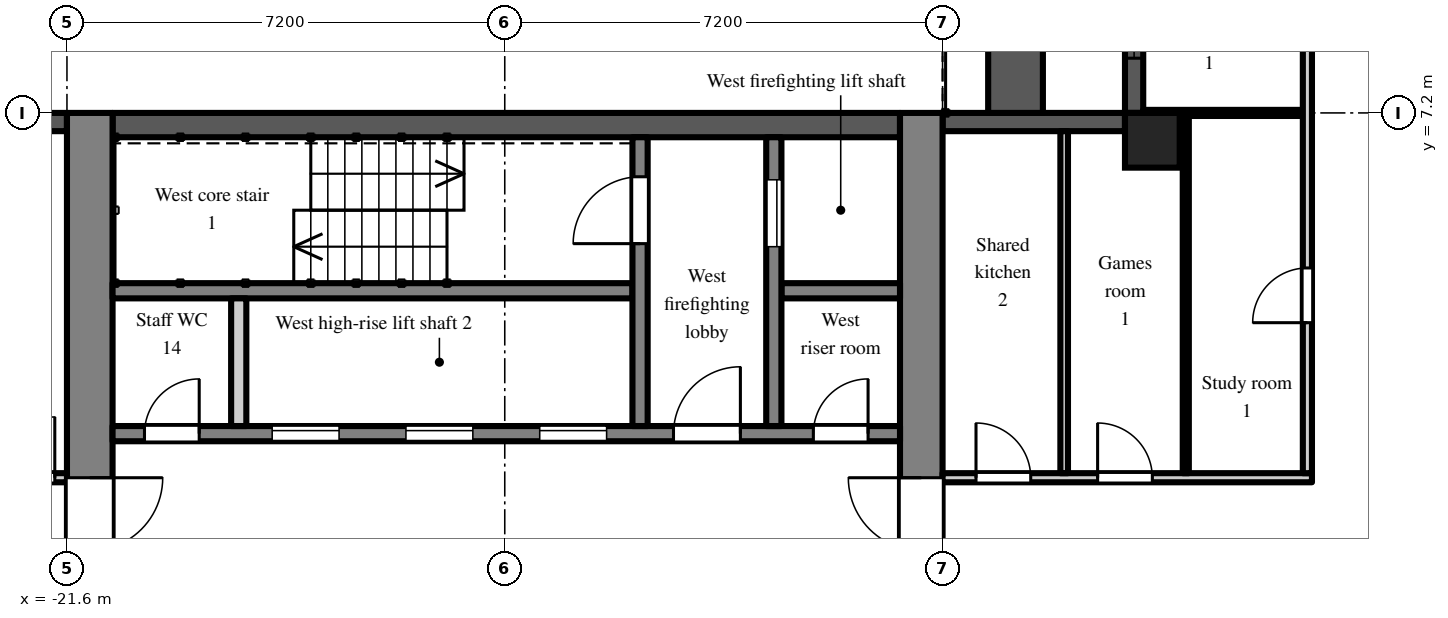
"""IFC4 building model, lengths in metres.
Left out: names, types, materials, properties, quantities, classifications, styles, units other than length and angle.
Written with IfcOpenShell. Run it as: python <this file> out.ifc"""

import sys

from ifc_helpers import new_model, si_unit, direction, frame, frame_2d, origin, origin_2d, place, context, subcontext, project, spatial, rectangle, extrude, element, fill, save


model = new_model("IFC4")
c1 = context("Model", 3, precision=1e-05, world=origin(), true_north=direction((0.0, 1.0)))
c2 = subcontext(c1, "Body", "Model", "MODEL_VIEW")
j1 = project(units=[si_unit("LENGTHUNIT", "METRE"), si_unit("PLANEANGLEUNIT", "RADIAN")], contexts=[c1])
p1 = place(None, origin())
s1 = spatial("IfcSite", under=j1, at=p1, CompositionType="ELEMENT")
p2 = place(p1, origin())
s2 = spatial("IfcBuilding", under=s1, at=p2, CompositionType="ELEMENT")
p3 = place(p2, frame((0.0, 0.0, 198.9)))
s3 = spatial("IfcBuildingStorey", under=s2, at=p3, CompositionType="ELEMENT", Elevation=198.9)
p4 = place(p3, frame((-3.75, 6.75, 0.0), z_axis=(0.0, 0.0, 1.0), x_axis=(1.0, 0.0, 0.0)))
e1 = element("IfcColumn", 1, at=p4, inside=s3, PredefinedType="COLUMN", context=c2, shape_type="SweptSolid", body=[
    extrude(rectangle(XDim=0.9, YDim=0.9, at=origin_2d()), origin(), (0.0, 0.0, 1.0), 3.0),
])
p5 = place(p3, frame((-4.05, 14.4, 0.0), z_axis=(0.0, 0.0, 1.0), x_axis=(0.0, -1.0, 0.0)))
e2 = element("IfcWall", 2, at=p5, inside=s3, PredefinedType="SOLIDWALL", context=c2, shape_type="SweptSolid", body=[
    extrude(rectangle(XDim=7.2, YDim=0.3, at=frame_2d((3.6, 0.0))), origin(), (0.0, 0.0, 1.0), 2.3),
])
p6 = place(p5, frame((3.0, 0.0, 0.0)))
e3 = element("IfcOpeningElement", 3, at=p6, cuts=e2, PredefinedType="OPENING", context=c2, shape_type="SweptSolid", body=[
    extrude(rectangle(XDim=1.2, YDim=2.05, at=frame_2d((0.6, 1.025))), frame((0.0, 0.16, 0.0), z_axis=(0.0, -1.0, 0.0), x_axis=(1.0, 0.0, 0.0)), (0.0, 0.0, 1.0), 0.32),
])
p7 = place(p5, frame((0.9, 0.0, 0.2)))
e4 = element("IfcOpeningElement", 4, at=p7, cuts=e2, PredefinedType="OPENING", context=c2, shape_type="SweptSolid", body=[
    extrude(rectangle(XDim=1.8, YDim=1.85, at=frame_2d((0.9, 0.925))), frame((0.0, 0.16, 0.0), z_axis=(0.0, -1.0, 0.0), x_axis=(1.0, 0.0, 0.0)), (0.0, 0.0, 1.0), 0.32),
])
p8 = place(p5, frame((4.5, 0.0, 0.2)))
e5 = element("IfcOpeningElement", 5, at=p8, cuts=e2, PredefinedType="OPENING", context=c2, shape_type="SweptSolid", body=[
    extrude(rectangle(XDim=1.8, YDim=1.85, at=frame_2d((0.9, 0.925))), frame((0.0, 0.16, 0.0), z_axis=(0.0, -1.0, 0.0), x_axis=(1.0, 0.0, 0.0)), (0.0, 0.0, 1.0), 0.32),
])
p9 = place(p3, frame((-4.2, 7.05, 0.0), z_axis=(0.0, 0.0, 1.0), x_axis=(-1.0, 0.0, 0.0)))
e6 = element("IfcWall", 6, at=p9, inside=s3, PredefinedType="SOLIDWALL", context=c2, shape_type="SweptSolid", body=[
    extrude(rectangle(XDim=3.0, YDim=0.3, at=frame_2d((1.5, 0.0))), origin(), (0.0, 0.0, 1.0), 2.3),
])
p10 = place(p3, frame((-21.6, 7.05, 0.0), z_axis=(0.0, 0.0, 1.0), x_axis=(-1.0, 0.0, 0.0)))
e7 = element("IfcWall", 7, at=p10, inside=s3, PredefinedType="SOLIDWALL", context=c2, shape_type="SweptSolid", body=[
    extrude(rectangle(XDim=2.7, YDim=0.3, at=frame_2d((1.35, 0.0))), origin(), (0.0, 0.0, 1.0), 2.3),
])
p11 = place(p10, frame((0.75, 0.0, 0.2)))
e8 = element("IfcOpeningElement", 8, at=p11, cuts=e7, PredefinedType="OPENING", context=c2, shape_type="SweptSolid", body=[
    extrude(rectangle(XDim=1.2, YDim=1.85, at=frame_2d((0.6, 0.925))), frame((0.0, 0.16, 0.0), z_axis=(0.0, -1.0, 0.0), x_axis=(1.0, 0.0, 0.0)), (0.0, 0.0, 1.0), 0.32),
])
p12 = place(p3, frame((-6.0, 7.2, 0.0), z_axis=(0.0, 0.0, 1.0), x_axis=(0.0, 1.0, 0.0)))
e9 = element("IfcWall", 9, at=p12, inside=s3, PredefinedType="PARAPET", context=c2, shape_type="SweptSolid", body=[
    extrude(rectangle(XDim=7.2, YDim=0.9, at=frame_2d((3.6, 0.0))), origin(), (0.0, 0.0, 1.0), 0.8),
])
p13 = place(p3, frame((-7.55, -7.2, 0.0), z_axis=(0.0, 0.0, 1.0), x_axis=(0.0, 1.0, 0.0)))
e10 = element("IfcWall", 10, at=p13, inside=s3, PredefinedType="SHEAR", context=c2, shape_type="SweptSolid", body=[
    extrude(rectangle(XDim=14.4, YDim=0.7, at=frame_2d((7.2, 0.0))), origin(), (0.0, 0.0, 1.0), 2.6),
])
p14 = place(p13, frame((6.0, 0.0, 0.0)))
e11 = element("IfcOpeningElement", 11, at=p14, cuts=e10, PredefinedType="OPENING", context=c2, shape_type="SweptSolid", body=[
    extrude(rectangle(XDim=2.4, YDim=2.2, at=frame_2d((1.2, 1.1))), frame((0.0, 0.36, 0.0), z_axis=(0.0, -1.0, 0.0), x_axis=(1.0, 0.0, 0.0)), (0.0, 0.0, 1.0), 0.72),
])
p15 = place(p3, frame((-21.225, -7.2, 0.0), z_axis=(0.0, 0.0, 1.0), x_axis=(0.0, 1.0, 0.0)))
e12 = element("IfcWall", 12, at=p15, inside=s3, PredefinedType="SHEAR", context=c2, shape_type="SweptSolid", body=[
    extrude(rectangle(XDim=14.4, YDim=0.75, at=frame_2d((7.2, 0.0))), origin(), (0.0, 0.0, 1.0), 2.6),
])
p16 = place(p15, frame((6.0, 0.0, 0.0)))
e13 = element("IfcOpeningElement", 13, at=p16, cuts=e12, PredefinedType="OPENING", context=c2, shape_type="SweptSolid", body=[
    extrude(rectangle(XDim=2.4, YDim=2.2, at=frame_2d((1.2, 1.1))), frame((0.0, 0.385, 0.0), z_axis=(0.0, -1.0, 0.0), x_axis=(1.0, 0.0, 0.0)), (0.0, 0.0, 1.0), 0.77),
])
p17 = place(p3, frame((-7.9, 7.0, 0.0), z_axis=(0.0, 0.0, 1.0), x_axis=(-1.0, 0.0, 0.0)))
e14 = element("IfcWall", 14, at=p17, inside=s3, PredefinedType="SHEAR", context=c2, shape_type="SweptSolid", body=[
    extrude(rectangle(XDim=12.95, YDim=0.4, at=frame_2d((6.475, 0.0))), origin(), (0.0, 0.0, 1.0), 2.6),
])
p18 = place(p3, frame((-7.9, 1.925, 0.0), z_axis=(0.0, 0.0, 1.0), x_axis=(-1.0, 0.0, 0.0)))
e15 = element("IfcWall", 15, at=p18, inside=s3, PredefinedType="SHEAR", context=c2, shape_type="SweptSolid", body=[
    extrude(rectangle(XDim=12.95, YDim=0.25, at=frame_2d((6.475, 0.0))), origin(), (0.0, 0.0, 1.0), 2.6),
])
p19 = place(p18, frame((4.825, 0.0, 0.0)))
e16 = element("IfcOpeningElement", 16, at=p19, cuts=e15, PredefinedType="OPENING", context=c2, shape_type="SweptSolid", body=[
    extrude(rectangle(XDim=1.1, YDim=2.1, at=frame_2d((0.55, 1.05))), frame((0.0, 0.135, 0.0), z_axis=(0.0, -1.0, 0.0), x_axis=(1.0, 0.0, 0.0)), (0.0, 0.0, 1.0), 0.27),
])
p20 = place(p18, frame((7.025, 0.0, 0.0)))
e17 = element("IfcOpeningElement", 17, at=p20, cuts=e15, PredefinedType="OPENING", context=c2, shape_type="SweptSolid", body=[
    extrude(rectangle(XDim=1.1, YDim=2.1, at=frame_2d((0.55, 1.05))), frame((0.0, 0.135, 0.0), z_axis=(0.0, -1.0, 0.0), x_axis=(1.0, 0.0, 0.0)), (0.0, 0.0, 1.0), 0.27),
])
p21 = place(p18, frame((9.225, 0.0, 0.0)))
e18 = element("IfcOpeningElement", 18, at=p21, cuts=e15, PredefinedType="OPENING", context=c2, shape_type="SweptSolid", body=[
    extrude(rectangle(XDim=1.1, YDim=2.1, at=frame_2d((0.55, 1.05))), frame((0.0, 0.135, 0.0), z_axis=(0.0, -1.0, 0.0), x_axis=(1.0, 0.0, 0.0)), (0.0, 0.0, 1.0), 0.27),
])
p22 = place(p18, frame((0.525, 0.0, 0.0)))
e19 = element("IfcOpeningElement", 19, at=p22, cuts=e15, PredefinedType="OPENING", context=c2, shape_type="SweptSolid", body=[
    extrude(rectangle(XDim=0.9, YDim=2.1, at=frame_2d((0.45, 1.05))), frame((0.0, 0.135, 0.0), z_axis=(0.0, -1.0, 0.0), x_axis=(1.0, 0.0, 0.0)), (0.0, 0.0, 1.0), 0.27),
])
p23 = place(p18, frame((2.625, 0.0, 0.0)))
e20 = element("IfcOpeningElement", 20, at=p23, cuts=e15, PredefinedType="OPENING", context=c2, shape_type="SweptSolid", body=[
    extrude(rectangle(XDim=1.1, YDim=2.1, at=frame_2d((0.55, 1.05))), frame((0.0, 0.135, 0.0), z_axis=(0.0, -1.0, 0.0), x_axis=(1.0, 0.0, 0.0)), (0.0, 0.0, 1.0), 0.27),
])
p24 = place(p18, frame((11.525, 0.0, 0.0)))
e21 = element("IfcOpeningElement", 21, at=p24, cuts=e15, PredefinedType="OPENING", context=c2, shape_type="SweptSolid", body=[
    extrude(rectangle(XDim=0.9, YDim=2.1, at=frame_2d((0.45, 1.05))), frame((0.0, 0.135, 0.0), z_axis=(0.0, -1.0, 0.0), x_axis=(1.0, 0.0, 0.0)), (0.0, 0.0, 1.0), 0.27),
])
p25 = place(p3, frame((-7.9, 4.275, 0.0), z_axis=(0.0, 0.0, 1.0), x_axis=(-1.0, 0.0, 0.0)))
e22 = element("IfcWall", 22, at=p25, inside=s3, PredefinedType="SHEAR", context=c2, shape_type="SweptSolid", body=[
    extrude(rectangle(XDim=1.95, YDim=0.25, at=frame_2d((0.975, 0.0))), origin(), (0.0, 0.0, 1.0), 2.6),
])
p26 = place(p3, frame((-12.3, 4.275, 0.0), z_axis=(0.0, 0.0, 1.0), x_axis=(-1.0, 0.0, 0.0)))
e23 = element("IfcWall", 23, at=p26, inside=s3, PredefinedType="SHEAR", context=c2, shape_type="SweptSolid", body=[
    extrude(rectangle(XDim=8.55, YDim=0.25, at=frame_2d((4.275, 0.0))), origin(), (0.0, 0.0, 1.0), 2.6),
])
p27 = place(p3, frame((-9.975, 2.05, 0.0), z_axis=(0.0, 0.0, 1.0), x_axis=(0.0, 1.0, 0.0)))
e24 = element("IfcWall", 24, at=p27, inside=s3, PredefinedType="SHEAR", context=c2, shape_type="SweptSolid", body=[
    extrude(rectangle(XDim=4.75, YDim=0.25, at=frame_2d((2.375, 0.0))), origin(), (0.0, 0.0, 1.0), 2.6),
])
p28 = place(p27, frame((2.95, 0.0, 0.0)))
e25 = element("IfcOpeningElement", 25, at=p28, cuts=e24, PredefinedType="OPENING", context=c2, shape_type="SweptSolid", body=[
    extrude(rectangle(XDim=1.1, YDim=2.1, at=frame_2d((0.55, 1.05))), frame((0.0, 0.135, 0.0), z_axis=(0.0, -1.0, 0.0), x_axis=(1.0, 0.0, 0.0)), (0.0, 0.0, 1.0), 0.27),
])
p29 = place(p3, frame((-12.175, 2.05, 0.0), z_axis=(0.0, 0.0, 1.0), x_axis=(0.0, 1.0, 0.0)))
e26 = element("IfcWall", 26, at=p29, inside=s3, PredefinedType="SHEAR", context=c2, shape_type="SweptSolid", body=[
    extrude(rectangle(XDim=4.75, YDim=0.25, at=frame_2d((2.375, 0.0))), origin(), (0.0, 0.0, 1.0), 2.6),
])
p30 = place(p29, frame((3.0, 0.0, 0.0)))
e27 = element("IfcOpeningElement", 27, at=p30, cuts=e26, PredefinedType="OPENING", context=c2, shape_type="SweptSolid", body=[
    extrude(rectangle(XDim=1.1, YDim=2.1, at=frame_2d((0.55, 1.05))), frame((0.0, 0.135, 0.0), z_axis=(0.0, -1.0, 0.0), x_axis=(1.0, 0.0, 0.0)), (0.0, 0.0, 1.0), 0.27),
])
p31 = place(p3, frame((-18.775, 2.05, 0.0), z_axis=(0.0, 0.0, 1.0), x_axis=(0.0, 1.0, 0.0)))
e28 = element("IfcWall", 28, at=p31, inside=s3, PredefinedType="PARTITIONING", context=c2, shape_type="SweptSolid", body=[
    extrude(rectangle(XDim=2.1, YDim=0.25, at=frame_2d((1.05, 0.0))), origin(), (0.0, 0.0, 1.0), 2.6),
])
p32 = place(p3, frame((-25.125, 1.2, 0.0), z_axis=(0.0, 0.0, 1.0), x_axis=(1.0, 0.0, 0.0)))
e29 = element("IfcWall", 29, at=p32, inside=s3, PredefinedType="PARTITIONING", context=c2, shape_type="SweptSolid", body=[
    extrude(rectangle(XDim=3.525, YDim=0.15, at=frame_2d((1.762, 0.0))), origin(), (0.0, 0.0, 1.0), 2.6),
])
p33 = place(p32, frame((2.325, 0.0, 0.0)))
e30 = element("IfcOpeningElement", 30, at=p33, cuts=e29, PredefinedType="OPENING", context=c2, shape_type="SweptSolid", body=[
    extrude(rectangle(XDim=1.0, YDim=2.1, at=frame_2d((0.5, 1.05))), frame((0.0, 0.085, 0.0), z_axis=(0.0, -1.0, 0.0), x_axis=(1.0, 0.0, 0.0)), (0.0, 0.0, 1.0), 0.17),
])
p34 = place(p3, frame((-7.2, 1.2, 0.0), z_axis=(0.0, 0.0, 1.0), x_axis=(1.0, 0.0, 0.0)))
e31 = element("IfcWall", 31, at=p34, inside=s3, PredefinedType="PARTITIONING", context=c2, shape_type="SweptSolid", body=[
    extrude(rectangle(XDim=6.075, YDim=0.15, at=frame_2d((3.038, 0.0))), origin(), (0.0, 0.0, 1.0), 2.6),
])
p35 = place(p34, frame((2.55, 0.0, 0.0)))
e32 = element("IfcOpeningElement", 32, at=p35, cuts=e31, PredefinedType="OPENING", context=c2, shape_type="SweptSolid", body=[
    extrude(rectangle(XDim=0.9, YDim=2.1, at=frame_2d((0.45, 1.05))), frame((0.0, 0.085, 0.0), z_axis=(0.0, -1.0, 0.0), x_axis=(1.0, 0.0, 0.0)), (0.0, 0.0, 1.0), 0.17),
])
p36 = place(p34, frame((0.55, 0.0, 0.0)))
e33 = element("IfcOpeningElement", 33, at=p36, cuts=e31, PredefinedType="OPENING", context=c2, shape_type="SweptSolid", body=[
    extrude(rectangle(XDim=0.9, YDim=2.1, at=frame_2d((0.45, 1.05))), frame((0.0, 0.085, 0.0), z_axis=(0.0, -1.0, 0.0), x_axis=(1.0, 0.0, 0.0)), (0.0, 0.0, 1.0), 0.17),
])
p37 = place(p3, frame((-5.2, 1.275, 0.0), z_axis=(0.0, 0.0, 1.0), x_axis=(0.0, 1.0, 0.0)))
e34 = element("IfcWall", 34, at=p37, inside=s3, PredefinedType="PARTITIONING", context=c2, shape_type="SweptSolid", body=[
    extrude(rectangle(XDim=5.625, YDim=0.125, at=frame_2d((2.812, 0.0))), origin(), (0.0, 0.0, 1.0), 2.6),
])
p38 = place(p3, frame((-3.9, 7.2, 0.0), z_axis=(0.0, 0.0, 1.0), x_axis=(1.0, 0.0, 0.0)))
e35 = element("IfcWall", 35, at=p38, inside=s3, PredefinedType="PARTITIONING", context=c2, shape_type="SweptSolid", body=[
    extrude(rectangle(XDim=2.625, YDim=0.1, at=frame_2d((1.312, 0.0))), origin(), (0.0, 0.0, 1.0), 2.6),
])
p39 = place(p3, frame((-3.2, 1.275, 0.0), z_axis=(0.0, 0.0, 1.0), x_axis=(0.0, 1.0, 0.0)))
e36 = element("IfcWall", 36, at=p39, inside=s3, PredefinedType="PARTITIONING", context=c2, shape_type="SweptSolid", body=[
    extrude(rectangle(XDim=5.875, YDim=0.1, at=frame_2d((2.938, 0.0))), origin(), (0.0, 0.0, 1.0), 2.6),
])
p40 = place(p3, frame((-1.2, 1.275, 0.0), z_axis=(0.0, 0.0, 1.0), x_axis=(0.0, 1.0, 0.0)))
e37 = element("IfcWall", 37, at=p40, inside=s3, PredefinedType="PARTITIONING", context=c2, shape_type="SweptSolid", body=[
    extrude(rectangle(XDim=16.65, YDim=0.15, at=frame_2d((8.325, 0.0))), origin(), (0.0, 0.0, 1.0), 2.6),
])
p41 = place(p40, frame((2.475, 0.0, 0.0)))
e38 = element("IfcOpeningElement", 38, at=p41, cuts=e37, PredefinedType="OPENING", context=c2, shape_type="SweptSolid", body=[
    extrude(rectangle(XDim=0.9, YDim=2.1, at=frame_2d((0.45, 1.05))), frame((0.0, 0.085, 0.0), z_axis=(0.0, -1.0, 0.0), x_axis=(1.0, 0.0, 0.0)), (0.0, 0.0, 1.0), 0.17),
])
p42 = place(p40, frame((10.875, 0.0, 0.0)))
e39 = element("IfcOpeningElement", 39, at=p42, cuts=e37, PredefinedType="OPENING", context=c2, shape_type="SweptSolid", body=[
    extrude(rectangle(XDim=0.9, YDim=2.1, at=frame_2d((0.45, 1.05))), frame((0.0, 0.085, 0.0), z_axis=(0.0, -1.0, 0.0), x_axis=(1.0, 0.0, 0.0)), (0.0, 0.0, 1.0), 0.17),
])
p43 = place(p40, frame((13.725, 0.0, 0.0)))
e40 = element("IfcOpeningElement", 40, at=p43, cuts=e37, PredefinedType="OPENING", context=c2, shape_type="SweptSolid", body=[
    extrude(rectangle(XDim=1.0, YDim=2.1, at=frame_2d((0.5, 1.05))), frame((0.0, 0.085, 0.0), z_axis=(0.0, -1.0, 0.0), x_axis=(1.0, 0.0, 0.0)), (0.0, 0.0, 1.0), 0.17),
])
p44 = place(p8, origin())
e41 = element("IfcWindow", 41, at=p44, inside=s3, PartitioningType="SINGLE_PANEL", PredefinedType="WINDOW", context=c2, shape_type="SweptSolid", body=[
    extrude(rectangle(XDim=1.8, YDim=1.85, at=frame_2d((0.9, 0.925))), frame((0.0, 0.03, 0.0), z_axis=(0.0, -1.0, 0.0), x_axis=(1.0, 0.0, 0.0)), (0.0, 0.0, 1.0), 0.06),
])
fill(e5, e41)
p45 = place(p19, origin())
e42 = element("IfcDoor", 42, at=p45, inside=s3, OperationType="SLIDING_TO_LEFT", PredefinedType="DOOR", context=c2, shape_type="SweptSolid", body=[
    extrude(rectangle(XDim=1.1, YDim=2.1, at=frame_2d((0.55, 1.05))), frame((0.0, 0.025, 0.0), z_axis=(0.0, -1.0, 0.0), x_axis=(1.0, 0.0, 0.0)), (0.0, 0.0, 1.0), 0.05),
])
fill(e16, e42)
p46 = place(p20, origin())
e43 = element("IfcDoor", 43, at=p46, inside=s3, OperationType="SLIDING_TO_LEFT", PredefinedType="DOOR", context=c2, shape_type="SweptSolid", body=[
    extrude(rectangle(XDim=1.1, YDim=2.1, at=frame_2d((0.55, 1.05))), frame((0.0, 0.025, 0.0), z_axis=(0.0, -1.0, 0.0), x_axis=(1.0, 0.0, 0.0)), (0.0, 0.0, 1.0), 0.05),
])
fill(e17, e43)
p47 = place(p21, origin())
e44 = element("IfcDoor", 44, at=p47, inside=s3, OperationType="SLIDING_TO_LEFT", PredefinedType="DOOR", context=c2, shape_type="SweptSolid", body=[
    extrude(rectangle(XDim=1.1, YDim=2.1, at=frame_2d((0.55, 1.05))), frame((0.0, 0.025, 0.0), z_axis=(0.0, -1.0, 0.0), x_axis=(1.0, 0.0, 0.0)), (0.0, 0.0, 1.0), 0.05),
])
fill(e18, e44)
p48 = place(p28, origin())
e45 = element("IfcDoor", 45, at=p48, inside=s3, OperationType="SLIDING_TO_LEFT", PredefinedType="DOOR", context=c2, shape_type="SweptSolid", body=[
    extrude(rectangle(XDim=1.1, YDim=2.1, at=frame_2d((0.55, 1.05))), frame((0.0, 0.025, 0.0), z_axis=(0.0, -1.0, 0.0), x_axis=(1.0, 0.0, 0.0)), (0.0, 0.0, 1.0), 0.05),
])
fill(e25, e45)
p49 = place(p30, origin())
e46 = element("IfcDoor", 46, at=p49, inside=s3, OperationType="SINGLE_SWING_LEFT", PredefinedType="DOOR", context=c2, shape_type="SweptSolid", body=[
    extrude(rectangle(XDim=1.1, YDim=2.1, at=frame_2d((0.55, 1.05))), frame((0.0, 0.025, 0.0), z_axis=(0.0, -1.0, 0.0), x_axis=(1.0, 0.0, 0.0)), (0.0, 0.0, 1.0), 0.05),
])
fill(e27, e46)
p50 = place(p22, frame((0.9, 0.0, 0.0), z_axis=(0.0, 0.0, 1.0), x_axis=(-1.0, 0.0, 0.0)))
e47 = element("IfcDoor", 47, at=p50, inside=s3, OperationType="SINGLE_SWING_RIGHT", PredefinedType="DOOR", context=c2, shape_type="SweptSolid", body=[
    extrude(rectangle(XDim=0.9, YDim=2.1, at=frame_2d((0.45, 1.05))), frame((0.0, 0.025, 0.0), z_axis=(0.0, -1.0, 0.0), x_axis=(1.0, 0.0, 0.0)), (0.0, 0.0, 1.0), 0.05),
])
fill(e19, e47)
p51 = place(p23, frame((1.1, 0.0, 0.0), z_axis=(0.0, 0.0, 1.0), x_axis=(-1.0, 0.0, 0.0)))
e48 = element("IfcDoor", 48, at=p51, inside=s3, OperationType="SINGLE_SWING_RIGHT", PredefinedType="DOOR", context=c2, shape_type="SweptSolid", body=[
    extrude(rectangle(XDim=1.1, YDim=2.1, at=frame_2d((0.55, 1.05))), frame((0.0, 0.025, 0.0), z_axis=(0.0, -1.0, 0.0), x_axis=(1.0, 0.0, 0.0)), (0.0, 0.0, 1.0), 0.05),
])
fill(e20, e48)
p52 = place(p14, origin())
e49 = element("IfcDoor", 49, at=p52, inside=s3, OperationType="DOUBLE_DOOR_DOUBLE_SWING", PredefinedType="DOOR", context=c2, shape_type="SweptSolid", body=[
    extrude(rectangle(XDim=2.4, YDim=2.2, at=frame_2d((1.2, 1.1))), frame((0.0, 0.025, 0.0), z_axis=(0.0, -1.0, 0.0), x_axis=(1.0, 0.0, 0.0)), (0.0, 0.0, 1.0), 0.05),
])
fill(e11, e49)
p53 = place(p16, frame((2.4, 0.0, 0.0), z_axis=(0.0, 0.0, 1.0), x_axis=(-1.0, 0.0, 0.0)))
e50 = element("IfcDoor", 50, at=p53, inside=s3, OperationType="DOUBLE_DOOR_DOUBLE_SWING", PredefinedType="DOOR", context=c2, shape_type="SweptSolid", body=[
    extrude(rectangle(XDim=2.4, YDim=2.2, at=frame_2d((1.2, 1.1))), frame((0.0, 0.025, 0.0), z_axis=(0.0, -1.0, 0.0), x_axis=(1.0, 0.0, 0.0)), (0.0, 0.0, 1.0), 0.05),
])
fill(e13, e50)
p54 = place(p24, frame((0.9, 0.0, 0.0), z_axis=(0.0, 0.0, 1.0), x_axis=(-1.0, 0.0, 0.0)))
e51 = element("IfcDoor", 51, at=p54, inside=s3, OperationType="SINGLE_SWING_RIGHT", PredefinedType="DOOR", context=c2, shape_type="SweptSolid", body=[
    extrude(rectangle(XDim=0.9, YDim=2.1, at=frame_2d((0.45, 1.05))), frame((0.0, 0.025, 0.0), z_axis=(0.0, -1.0, 0.0), x_axis=(1.0, 0.0, 0.0)), (0.0, 0.0, 1.0), 0.05),
])
fill(e21, e51)
p55 = place(p41, origin())
e52 = element("IfcDoor", 52, at=p55, inside=s3, OperationType="SINGLE_SWING_LEFT", PredefinedType="DOOR", context=c2, shape_type="SweptSolid", body=[
    extrude(rectangle(XDim=0.9, YDim=2.1, at=frame_2d((0.45, 1.05))), frame((0.0, 0.025, 0.0), z_axis=(0.0, -1.0, 0.0), x_axis=(1.0, 0.0, 0.0)), (0.0, 0.0, 1.0), 0.05),
])
fill(e38, e52)
p56 = place(p35, origin())
e53 = element("IfcDoor", 53, at=p56, inside=s3, OperationType="SINGLE_SWING_LEFT", PredefinedType="DOOR", context=c2, shape_type="SweptSolid", body=[
    extrude(rectangle(XDim=0.9, YDim=2.1, at=frame_2d((0.45, 1.05))), frame((0.0, 0.025, 0.0), z_axis=(0.0, -1.0, 0.0), x_axis=(1.0, 0.0, 0.0)), (0.0, 0.0, 1.0), 0.05),
])
fill(e32, e53)
p57 = place(p36, origin())
e54 = element("IfcDoor", 54, at=p57, inside=s3, OperationType="SINGLE_SWING_LEFT", PredefinedType="DOOR", context=c2, shape_type="SweptSolid", body=[
    extrude(rectangle(XDim=0.9, YDim=2.1, at=frame_2d((0.45, 1.05))), frame((0.0, 0.025, 0.0), z_axis=(0.0, -1.0, 0.0), x_axis=(1.0, 0.0, 0.0)), (0.0, 0.0, 1.0), 0.05),
])
fill(e33, e54)
p58 = place(p33, origin())
e55 = element("IfcDoor", 55, at=p58, inside=s3, OperationType="SINGLE_SWING_RIGHT", PredefinedType="DOOR", context=c2, shape_type="SweptSolid", body=[
    extrude(rectangle(XDim=1.0, YDim=2.1, at=frame_2d((0.5, 1.05))), frame((0.0, 0.025, 0.0), z_axis=(0.0, -1.0, 0.0), x_axis=(1.0, 0.0, 0.0)), (0.0, 0.0, 1.0), 0.05),
])
fill(e30, e55)
save(model, sys.argv[1])
